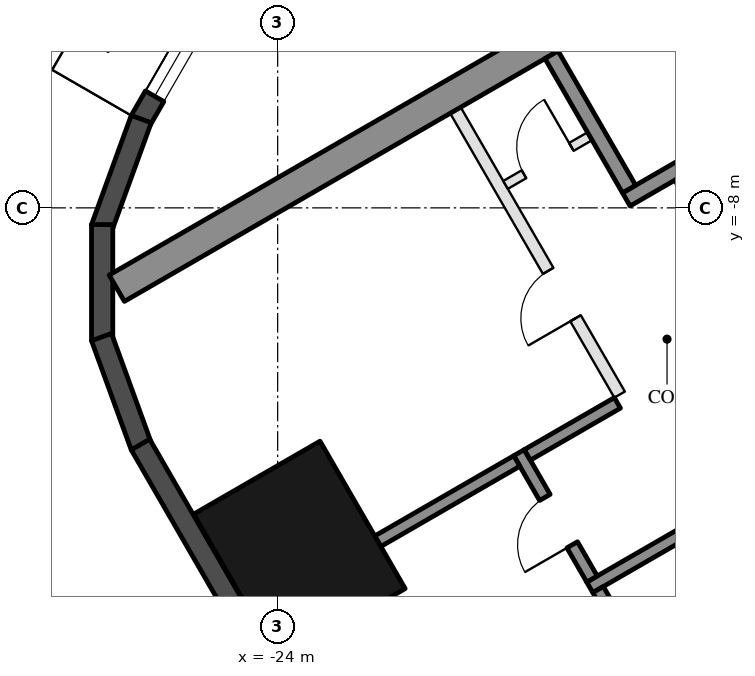
"""IFC4 building model, lengths in metres.
Left out: names, types, materials, properties, quantities, classifications, styles, units other than length and angle.
Written with IfcOpenShell. Run it as: python <this file> out.ifc"""

import sys

from ifc_helpers import new_model, si_unit, direction, frame, frame_2d, origin, origin_2d, place, context, subcontext, project, spatial, rectangle, hollow_rectangle, extrude, element, fill, save


model = new_model("IFC4")
c1 = context("Model", 3, precision=1e-05, world=origin(), true_north=direction((0.0, 1.0)))
c2 = subcontext(c1, "Body", "Model", "MODEL_VIEW")
j1 = project(units=[si_unit("LENGTHUNIT", "METRE"), si_unit("PLANEANGLEUNIT", "RADIAN")], contexts=[c1])
p1 = place(None, origin())
s1 = spatial("IfcSite", under=j1, at=p1, CompositionType="ELEMENT")
p2 = place(p1, origin())
s2 = spatial("IfcBuilding", under=s1, at=p2, CompositionType="ELEMENT")
p3 = place(p2, frame((0.0, 0.0, 46.5)))
s3 = spatial("IfcBuildingStorey", under=s2, at=p3, CompositionType="ELEMENT", Elevation=46.5)
p4 = place(p3, frame((-23.643, -13.65, 0.0), z_axis=(0.0, 0.0, 1.0), x_axis=(-0.5, 0.866025403784, 0.0)))
e1 = element("IfcColumn", 1, at=p4, inside=s3, PredefinedType="COLUMN", context=c2, shape_type="SweptSolid", body=[
    extrude(hollow_rectangle(XDim=2.8, YDim=2.4, WallThickness=0.07, at=origin_2d()), origin(), (0.0, 0.0, 1.0), 3.7),
])
p5 = place(p3, frame((-24.299, -3.176, 0.0), z_axis=(0.0, 0.0, 1.0), x_axis=(-0.500028278809, -0.866009076391, 0.0)))
e2 = element("IfcWall", 2, at=p5, inside=s3, PredefinedType="SOLIDWALL", context=c2, shape_type="SweptSolid", body=[
    extrude(rectangle(XDim=3.916, YDim=0.35, at=frame_2d((1.958, 0.0))), origin(), (0.0, 0.0, 1.0), 3.55),
])
p6 = place(p5, frame((1.75, 0.0, 0.3)))
e3 = element("IfcOpeningElement", 3, at=p6, cuts=e2, PredefinedType="OPENING", context=c2, shape_type="SweptSolid", body=[
    extrude(rectangle(XDim=1.7, YDim=2.65, at=frame_2d((0.85, 1.325))), frame((0.0, 0.185, 0.0), z_axis=(0.0, -1.0, 0.0), x_axis=(1.0, 0.0, 0.0)), (0.0, 0.0, 1.0), 0.37),
])
for number, where, z_axis, x_axis in (
    (4, (-26.244, -6.54, 0.0), (0.0, 0.0, 1.0), (-0.342, -0.94, 0.0)),
    (5, (-26.886, -8.275, 0.0), (0.0, 0.0, 1.0), (0.0, -1.0, 0.0)),
    (6, (-26.897, -10.125, 0.0), (0.0, 0.0, 1.0), (0.342, -0.94, 0.0)),
):
    element("IfcWall", number, at=place(p3, frame(where, z_axis=z_axis, x_axis=x_axis)), inside=s3, PredefinedType="SOLIDWALL", context=c2, shape_type="SweptSolid", body=[
        extrude(rectangle(XDim=1.91, YDim=0.35, at=frame_2d((0.955, 0.0))), origin(), (0.0, 0.0, 1.0), 3.55),
    ])
p7 = place(p3, frame((-26.257, -11.893, 0.0), z_axis=(0.0, 0.0, 1.0), x_axis=(0.500018773155, -0.866014564827, 0.0)))
e7 = element("IfcWall", 7, at=p7, inside=s3, PredefinedType="SOLIDWALL", context=c2, shape_type="SweptSolid", body=[
    extrude(rectangle(XDim=5.658, YDim=0.35, at=frame_2d((2.829, 0.0))), origin(), (0.0, 0.0, 1.0), 3.55),
])
for number, where, z_axis, x_axis in (
    (8, (-13.797, -1.903, 0.0), (0.0, 0.0, 1.0), (-0.866, -0.5, 0.0)),
    (9, (-8.547, -10.997, 0.0), (0.0, 0.0, 1.0), (-0.866, -0.5, 0.0)),
):
    element("IfcWall", number, at=place(p3, frame(where, z_axis=z_axis, x_axis=x_axis)), inside=s3, PredefinedType="SHEAR", context=c2, shape_type="SweptSolid", body=[
        extrude(rectangle(XDim=14.837, YDim=0.5, at=frame_2d((7.418, 0.0))), origin(), (0.0, 0.0, 1.0), 3.5),
    ])
p8 = place(p3, frame((-12.681, -4.636, 0.0), z_axis=(0.0, 0.0, 1.0), x_axis=(-0.866021702275, -0.500006411147, 0.0)))
e10 = element("IfcWall", 10, at=p8, inside=s3, PredefinedType="SHEAR", context=c2, shape_type="SweptSolid", body=[
    extrude(rectangle(XDim=6.45, YDim=0.25, at=frame_2d((3.225, 0.0))), origin(), (0.0, 0.0, 1.0), 3.5),
])
p9 = place(p8, frame((0.3, 0.0, 0.0)))
e11 = element("IfcOpeningElement", 11, at=p9, cuts=e10, PredefinedType="OPENING", context=c2, shape_type="SweptSolid", body=[
    extrude(rectangle(XDim=1.0, YDim=2.1, at=frame_2d((0.5, 1.05))), frame((0.0, 0.135, 0.0), z_axis=(0.0, -1.0, 0.0), x_axis=(1.0, 0.0, 0.0)), (0.0, 0.0, 1.0), 0.27),
])
p10 = place(p3, frame((-19.496, -5.482, 0.0), z_axis=(0.0, 0.0, 1.0), x_axis=(0.499990435942, -0.866030925526, 0.0)))
e12 = element("IfcWall", 12, at=p10, inside=s3, PredefinedType="SHEAR", context=c2, shape_type="SweptSolid", body=[
    extrude(rectangle(XDim=2.55, YDim=0.25, at=frame_2d((1.275, 0.0))), origin(), (0.0, 0.0, 1.0), 3.5),
])
p11 = place(p3, frame((-17.381, -7.495, 0.0), z_axis=(0.0, 0.0, 1.0), x_axis=(0.500011755427, -0.866018616679, 0.0)))
e13 = element("IfcWall", 13, at=p11, inside=s3, PredefinedType="SHEAR", context=c2, shape_type="SweptSolid", body=[
    extrude(rectangle(XDim=2.8, YDim=0.2, at=frame_2d((1.4, 0.0))), origin(), (0.0, 0.0, 1.0), 3.5),
])
p12 = place(p3, frame((-10.068, -9.162, 0.0), z_axis=(0.0, 0.0, 1.0), x_axis=(-0.866032725843, -0.499987317609, 0.0)))
e14 = element("IfcWall", 14, at=p12, inside=s3, PredefinedType="SHEAR", context=c2, shape_type="SweptSolid", body=[
    extrude(rectangle(XDim=10.16, YDim=0.2, at=frame_2d((5.08, 0.0))), origin(), (0.0, 0.0, 1.0), 3.5),
])
p13 = place(p12, frame((0.72, 0.0, 0.0)))
e15 = element("IfcOpeningElement", 15, at=p13, cuts=e14, PredefinedType="OPENING", context=c2, shape_type="SweptSolid", body=[
    extrude(rectangle(XDim=0.9, YDim=2.1, at=frame_2d((0.45, 1.05))), frame((0.0, 0.11, 0.0), z_axis=(0.0, -1.0, 0.0), x_axis=(1.0, 0.0, 0.0)), (0.0, 0.0, 1.0), 0.22),
])
p14 = place(p12, frame((5.8, 0.0, 0.0)))
e16 = element("IfcOpeningElement", 16, at=p14, cuts=e14, PredefinedType="OPENING", context=c2, shape_type="SweptSolid", body=[
    extrude(rectangle(XDim=0.9, YDim=2.1, at=frame_2d((0.45, 1.05))), frame((0.0, 0.11, 0.0), z_axis=(0.0, -1.0, 0.0), x_axis=(1.0, 0.0, 0.0)), (0.0, 0.0, 1.0), 0.22),
])
p15 = place(p3, frame((-20.031, -12.026, 0.0), z_axis=(0.0, 0.0, 1.0), x_axis=(0.500033551112, -0.866006032174, 0.0)))
e17 = element("IfcWall", 17, at=p15, inside=s3, PredefinedType="SHEAR", context=c2, shape_type="SweptSolid", body=[
    extrude(rectangle(XDim=2.4, YDim=0.2, at=frame_2d((1.2, 0.0))), origin(), (0.0, 0.0, 1.0), 3.5),
])
p16 = place(p15, frame((0.85, 0.0, 0.0)))
e18 = element("IfcOpeningElement", 18, at=p16, cuts=e17, PredefinedType="OPENING", context=c2, shape_type="SweptSolid", body=[
    extrude(rectangle(XDim=0.9, YDim=2.1, at=frame_2d((0.45, 1.05))), frame((0.0, 0.11, 0.0), z_axis=(0.0, -1.0, 0.0), x_axis=(1.0, 0.0, 0.0)), (0.0, 0.0, 1.0), 0.22),
])
p17 = place(p3, frame((-18.413, -11.208, 0.0), z_axis=(0.0, 0.0, 1.0), x_axis=(-0.866038183914, -0.499977863513, 0.0)))
e19 = element("IfcWall", 19, at=p17, inside=s3, PredefinedType="SHEAR", context=c2, shape_type="SweptSolid", body=[
    extrude(rectangle(XDim=1.71, YDim=0.2, at=frame_2d((0.855, 0.0))), origin(), (0.0, 0.0, 1.0), 3.5),
])
p18 = place(p3, frame((-18.73, -14.278, 0.0), z_axis=(0.0, 0.0, 1.0), x_axis=(0.50002537861, -0.866010750942, 0.0)))
e20 = element("IfcWall", 20, at=p18, inside=s3, PredefinedType="SHEAR", context=c2, shape_type="SweptSolid", body=[
    extrude(rectangle(XDim=2.0, YDim=0.2, at=frame_2d((1.0, 0.0))), origin(), (0.0, 0.0, 1.0), 3.5),
])
p19 = place(p3, frame((-20.067, -12.163, 0.0), z_axis=(0.0, 0.0, 1.0), x_axis=(-0.866060851709, -0.499938597367, 0.0)))
e21 = element("IfcWall", 21, at=p19, inside=s3, PredefinedType="SHEAR", context=c2, shape_type="SweptSolid", body=[
    extrude(rectangle(XDim=2.64, YDim=0.2, at=frame_2d((1.32, 0.0))), origin(), (0.0, 0.0, 1.0), 3.5),
])
p20 = place(p3, frame((-21.076, -6.395, 0.0), z_axis=(0.0, 0.0, 1.0), x_axis=(0.50001468107, -0.866016927499, 0.0)))
e22 = element("IfcWall", 22, at=p20, inside=s3, PredefinedType="PARTITIONING", context=c2, shape_type="SweptSolid", body=[
    extrude(rectangle(XDim=5.4, YDim=0.2, at=frame_2d((2.7, 0.0))), origin(), (0.0, 0.0, 1.0), 3.5),
])
p21 = place(p20, frame((3.05, 0.0, 0.0)))
e23 = element("IfcOpeningElement", 23, at=p21, cuts=e22, PredefinedType="OPENING", context=c2, shape_type="SweptSolid", body=[
    extrude(rectangle(XDim=0.9, YDim=2.1, at=frame_2d((0.45, 1.05))), frame((0.0, 0.11, 0.0), z_axis=(0.0, -1.0, 0.0), x_axis=(1.0, 0.0, 0.0)), (0.0, 0.0, 1.0), 0.22),
])
p22 = place(p3, frame((-18.866, -6.822, 0.0), z_axis=(0.0, 0.0, 1.0), x_axis=(-0.866028054938, -0.499995408039, 0.0)))
e24 = element("IfcWall", 24, at=p22, inside=s3, PredefinedType="PARTITIONING", context=c2, shape_type="SweptSolid", body=[
    extrude(rectangle(XDim=1.6, YDim=0.15, at=frame_2d((0.8, 0.0))), origin(), (0.0, 0.0, 1.0), 3.5),
])
p23 = place(p22, frame((0.35, 0.0, 0.0)))
e25 = element("IfcOpeningElement", 25, at=p23, cuts=e24, PredefinedType="OPENING", context=c2, shape_type="SweptSolid", body=[
    extrude(rectangle(XDim=0.9, YDim=2.1, at=frame_2d((0.45, 1.05))), frame((0.0, 0.085, 0.0), z_axis=(0.0, -1.0, 0.0), x_axis=(1.0, 0.0, 0.0)), (0.0, 0.0, 1.0), 0.17),
])
p24 = place(p6, origin())
e26 = element("IfcWindow", 26, at=p24, inside=s3, PartitioningType="SINGLE_PANEL", PredefinedType="WINDOW", context=c2, shape_type="SweptSolid", body=[
    extrude(rectangle(XDim=1.7, YDim=2.65, at=frame_2d((0.85, 1.325))), frame((0.0, 0.03, 0.0), z_axis=(0.0, -1.0, 0.0), x_axis=(1.0, 0.0, 0.0)), (0.0, 0.0, 1.0), 0.06),
])
fill(e3, e26)
p25 = place(p23, frame((0.9, 0.0, 0.0), z_axis=(0.0, 0.0, 1.0), x_axis=(-1.0, 0.0, 0.0)))
e27 = element("IfcDoor", 27, at=p25, inside=s3, OperationType="SINGLE_SWING_RIGHT", PredefinedType="DOOR", context=c2, shape_type="SweptSolid", body=[
    extrude(rectangle(XDim=0.9, YDim=2.1, at=frame_2d((0.45, 1.05))), frame((0.0, 0.025, 0.0), z_axis=(0.0, -1.0, 0.0), x_axis=(1.0, 0.0, 0.0)), (0.0, 0.0, 1.0), 0.05),
])
fill(e25, e27)
p26 = place(p16, frame((0.9, 0.0, 0.0), z_axis=(0.0, 0.0, 1.0), x_axis=(-1.0, 0.0, 0.0)))
e28 = element("IfcDoor", 28, at=p26, inside=s3, OperationType="SINGLE_SWING_LEFT", PredefinedType="DOOR", context=c2, shape_type="SweptSolid", body=[
    extrude(rectangle(XDim=0.9, YDim=2.1, at=frame_2d((0.45, 1.05))), frame((0.0, 0.025, 0.0), z_axis=(0.0, -1.0, 0.0), x_axis=(1.0, 0.0, 0.0)), (0.0, 0.0, 1.0), 0.05),
])
fill(e18, e28)
p27 = place(p21, frame((0.9, 0.0, 0.0), z_axis=(0.0, 0.0, 1.0), x_axis=(-1.0, 0.0, 0.0)))
e29 = element("IfcDoor", 29, at=p27, inside=s3, OperationType="SINGLE_SWING_LEFT", PredefinedType="DOOR", context=c2, shape_type="SweptSolid", body=[
    extrude(rectangle(XDim=0.9, YDim=2.1, at=frame_2d((0.45, 1.05))), frame((0.0, 0.025, 0.0), z_axis=(0.0, -1.0, 0.0), x_axis=(1.0, 0.0, 0.0)), (0.0, 0.0, 1.0), 0.05),
])
fill(e23, e29)
save(model, sys.argv[1])
